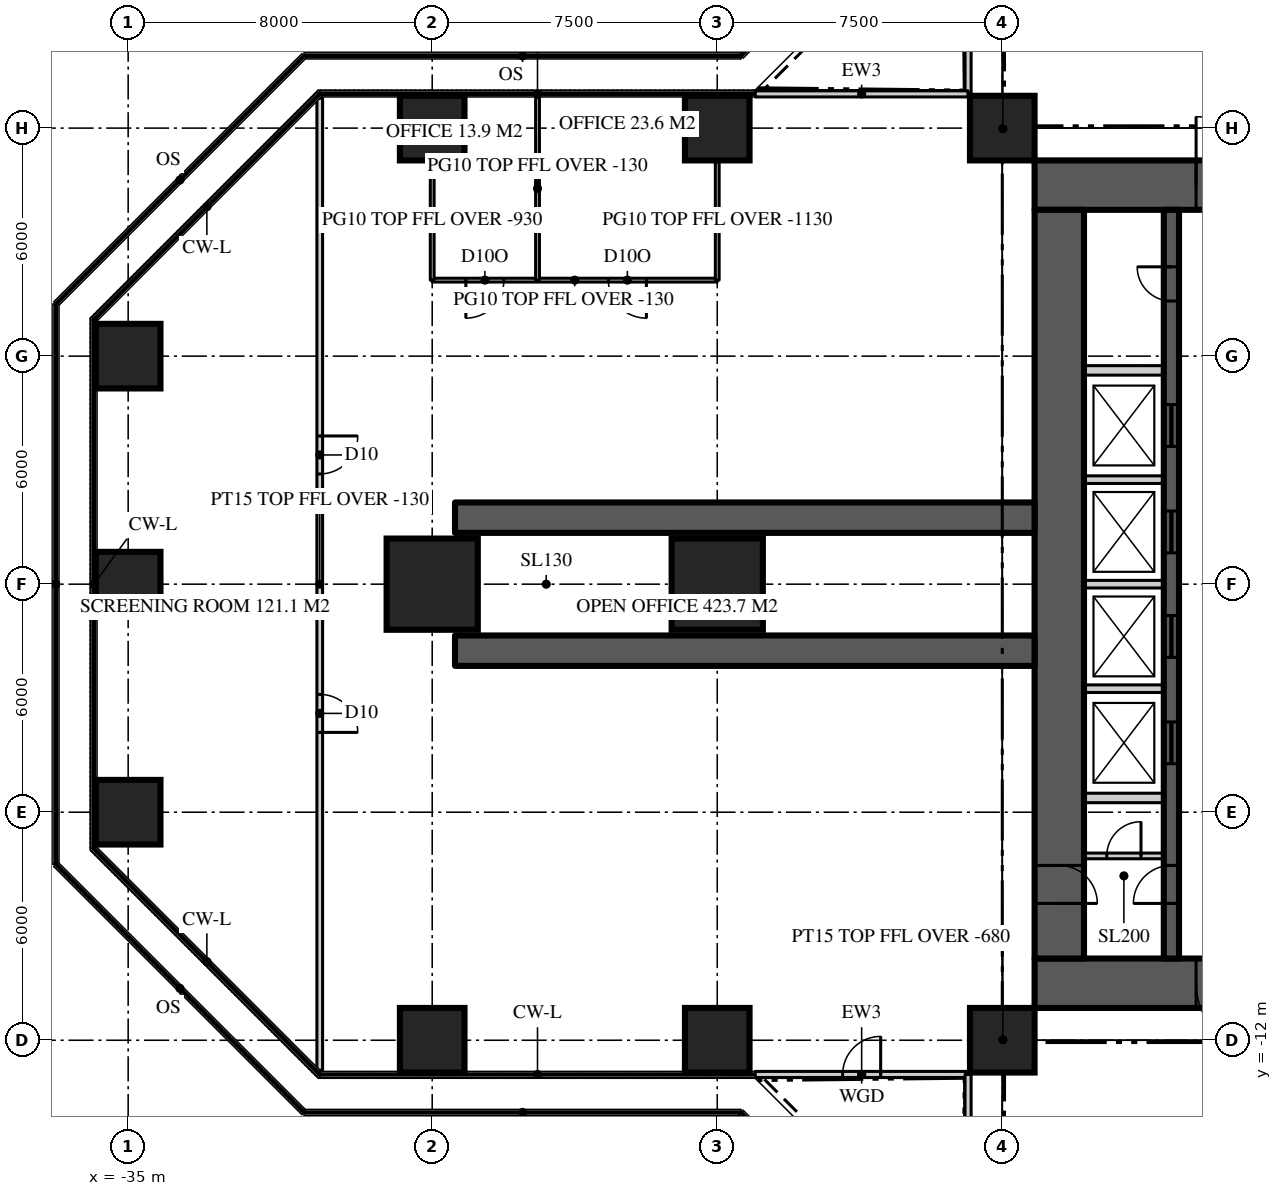
"""IFC4 building model, lengths in metres.
Left out: names, types, materials, properties, quantities, classifications, styles, units other than length and angle.
Written with IfcOpenShell. Run it as: python <this file> out.ifc"""

import sys

from ifc_helpers import new_model, si_unit, direction, frame, frame_2d, origin, origin_2d, place, context, subcontext, project, spatial, rectangle, extrude, element, fill, save


model = new_model("IFC4")
c1 = context("Model", 3, precision=1e-05, world=origin(), true_north=direction((0.0, 1.0)))
c2 = subcontext(c1, "Body", "Model", "MODEL_VIEW")
j1 = project(units=[si_unit("LENGTHUNIT", "METRE"), si_unit("PLANEANGLEUNIT", "RADIAN")], contexts=[c1])
p1 = place(None, origin())
s1 = spatial("IfcSite", under=j1, at=p1, CompositionType="ELEMENT")
p2 = place(p1, origin())
s2 = spatial("IfcBuilding", under=s1, at=p2, CompositionType="ELEMENT")
p3 = place(p2, frame((0.0, 0.0, 78.6)))
s3 = spatial("IfcBuildingStorey", under=s2, at=p3, CompositionType="ELEMENT", Elevation=78.6)
p4 = place(p3, frame((-11.15, 10.5, 0.0), z_axis=(0.0, 0.0, 1.0), x_axis=(1.0, 0.0, 0.0)))
e1 = element("IfcWall", 1, at=p4, inside=s3, PredefinedType="SHEAR", context=c2, shape_type="SweptSolid", body=[
    extrude(rectangle(XDim=22.3, YDim=1.3, at=frame_2d((11.15, 0.0))), origin(), (0.0, 0.0, 1.0), 3.9),
])
p5 = place(p4, frame((4.25, 0.0, 0.0)))
e2 = element("IfcOpeningElement", 2, at=p5, cuts=e1, PredefinedType="OPENING", context=c2, shape_type="SweptSolid", body=[
    extrude(rectangle(XDim=1.8, YDim=2.2, at=frame_2d((0.9, 1.1))), frame((0.0, 0.66, 0.0), z_axis=(0.0, -1.0, 0.0), x_axis=(1.0, 0.0, 0.0)), (0.0, 0.0, 1.0), 1.32),
])
p6 = place(p4, frame((16.25, 0.0, 0.0)))
e3 = element("IfcOpeningElement", 3, at=p6, cuts=e1, PredefinedType="OPENING", context=c2, shape_type="SweptSolid", body=[
    extrude(rectangle(XDim=1.8, YDim=2.2, at=frame_2d((0.9, 1.1))), frame((0.0, 0.66, 0.0), z_axis=(0.0, -1.0, 0.0), x_axis=(1.0, 0.0, 0.0)), (0.0, 0.0, 1.0), 1.32),
])
p7 = place(p3, frame((11.15, -10.5, 0.0), z_axis=(0.0, 0.0, 1.0), x_axis=(-1.0, 0.0, 0.0)))
e4 = element("IfcWall", 4, at=p7, inside=s3, PredefinedType="SHEAR", context=c2, shape_type="SweptSolid", body=[
    extrude(rectangle(XDim=22.3, YDim=1.3, at=frame_2d((11.15, 0.0))), origin(), (0.0, 0.0, 1.0), 3.9),
])
p8 = place(p7, frame((16.25, 0.0, 0.0)))
e5 = element("IfcOpeningElement", 5, at=p8, cuts=e4, PredefinedType="OPENING", context=c2, shape_type="SweptSolid", body=[
    extrude(rectangle(XDim=1.8, YDim=2.2, at=frame_2d((0.9, 1.1))), frame((0.0, 0.66, 0.0), z_axis=(0.0, -1.0, 0.0), x_axis=(1.0, 0.0, 0.0)), (0.0, 0.0, 1.0), 1.32),
])
p9 = place(p7, frame((4.25, 0.0, 0.0)))
e6 = element("IfcOpeningElement", 6, at=p9, cuts=e4, PredefinedType="OPENING", context=c2, shape_type="SweptSolid", body=[
    extrude(rectangle(XDim=1.8, YDim=2.2, at=frame_2d((0.9, 1.1))), frame((0.0, 0.66, 0.0), z_axis=(0.0, -1.0, 0.0), x_axis=(1.0, 0.0, 0.0)), (0.0, 0.0, 1.0), 1.32),
])
p10 = place(p3, frame((-10.5, 9.85, 0.0), z_axis=(0.0, 0.0, 1.0), x_axis=(0.0, -1.0, 0.0)))
e7 = element("IfcWall", 7, at=p10, inside=s3, PredefinedType="SHEAR", context=c2, shape_type="SweptSolid", body=[
    extrude(rectangle(XDim=19.7, YDim=1.3, at=frame_2d((9.85, 0.0))), origin(), (0.0, 0.0, 1.0), 3.9),
])
p11 = place(p10, frame((17.25, 0.0, 0.0)))
e8 = element("IfcOpeningElement", 8, at=p11, cuts=e7, PredefinedType="OPENING", context=c2, shape_type="SweptSolid", body=[
    extrude(rectangle(XDim=1.0, YDim=2.2, at=frame_2d((0.5, 1.1))), frame((0.0, 0.66, 0.0), z_axis=(0.0, -1.0, 0.0), x_axis=(1.0, 0.0, 0.0)), (0.0, 0.0, 1.0), 1.32),
])
for number, where, z_axis, x_axis in (
    (9, (-11.15, 1.75, 0.0), (0.0, 0.0, 1.0), (-1.0, 0.0, 0.0)),
    (10, (-11.15, -1.75, 0.0), (0.0, 0.0, 1.0), (-1.0, 0.0, 0.0)),
):
    element("IfcWall", number, at=place(p3, frame(where, z_axis=z_axis, x_axis=x_axis)), inside=s3, PredefinedType="SHEAR", context=c2, shape_type="SweptSolid", body=[
        extrude(rectangle(XDim=15.25, YDim=0.8, at=frame_2d((7.625, 0.0))), origin(), (0.0, 0.0, 1.0), 3.9),
    ])
for number, where, z_axis, x_axis in (
    (11, (-27.0, -12.0, 0.0), (0.0, 0.0, 1.0), (1.0, 0.0, 0.0)),
    (12, (-19.5, -12.0, 0.0), (0.0, 0.0, 1.0), (1.0, 0.0, 0.0)),
    (13, (-12.0, -12.0, 0.0), (0.0, 0.0, 1.0), (1.0, 0.0, 0.0)),
    (14, (-35.0, -6.0, 0.0), (0.0, 0.0, 1.0), (1.0, 0.0, 0.0)),
    (15, (-35.0, 0.0, 0.0), (0.0, 0.0, 1.0), (1.0, 0.0, 0.0)),
):
    element("IfcColumn", number, at=place(p3, frame(where, z_axis=z_axis, x_axis=x_axis)), inside=s3, PredefinedType="COLUMN", context=c2, shape_type="SweptSolid", body=[
        extrude(rectangle(XDim=1.7, YDim=1.7, at=origin_2d()), origin(), (0.0, 0.0, 1.0), 3.9),
    ])
for number, where, z_axis, x_axis in (
    (16, (-27.0, 0.0, 0.0), (0.0, 0.0, 1.0), (1.0, 0.0, 0.0)),
    (17, (-19.5, 0.0, 0.0), (0.0, 0.0, 1.0), (1.0, 0.0, 0.0)),
):
    element("IfcColumn", number, at=place(p3, frame(where, z_axis=z_axis, x_axis=x_axis)), inside=s3, PredefinedType="COLUMN", context=c2, shape_type="SweptSolid", body=[
        extrude(rectangle(XDim=2.4, YDim=2.4, at=origin_2d()), origin(), (0.0, 0.0, 1.0), 3.9),
    ])
for number, where, z_axis, x_axis in (
    (18, (-35.0, 6.0, 0.0), (0.0, 0.0, 1.0), (1.0, 0.0, 0.0)),
    (19, (-27.0, 12.0, 0.0), (0.0, 0.0, 1.0), (1.0, 0.0, 0.0)),
    (20, (-19.5, 12.0, 0.0), (0.0, 0.0, 1.0), (1.0, 0.0, 0.0)),
    (21, (-12.0, 12.0, 0.0), (0.0, 0.0, 1.0), (1.0, 0.0, 0.0)),
):
    element("IfcColumn", number, at=place(p3, frame(where, z_axis=z_axis, x_axis=x_axis)), inside=s3, PredefinedType="COLUMN", context=c2, shape_type="SweptSolid", body=[
        extrude(rectangle(XDim=1.7, YDim=1.7, at=origin_2d()), origin(), (0.0, 0.0, 1.0), 3.9),
    ])
p12 = place(p3, frame((-12.9, 18.5, 0.0), z_axis=(0.0, 0.0, 1.0), x_axis=(0.0, -1.0, 0.0)))
e22 = element("IfcWall", 22, at=p12, inside=s3, PredefinedType="SOLIDWALL", context=c2, shape_type="SweptSolid", body=[
    extrude(rectangle(XDim=5.6, YDim=0.16, at=frame_2d((2.8, 0.0))), origin(), (0.0, 0.0, 1.0), 3.77),
])
p13 = place(p12, frame((2.3, 0.0, 0.0)))
e23 = element("IfcOpeningElement", 23, at=p13, cuts=e22, PredefinedType="OPENING", context=c2, shape_type="SweptSolid", body=[
    extrude(rectangle(XDim=1.0, YDim=2.2, at=frame_2d((0.5, 1.1))), frame((0.0, 0.09, 0.0), z_axis=(0.0, -1.0, 0.0), x_axis=(1.0, 0.0, 0.0)), (0.0, 0.0, 1.0), 0.18),
])
p14 = place(p3, frame((-12.9, 12.9, 0.0), z_axis=(0.0, 0.0, 1.0), x_axis=(-1.0, 0.0, 0.0)))
e24 = element("IfcWall", 24, at=p14, inside=s3, PredefinedType="SOLIDWALL", context=c2, shape_type="SweptSolid", body=[
    extrude(rectangle(XDim=5.6, YDim=0.16, at=frame_2d((2.8, 0.0))), origin(), (0.0, 0.0, 1.0), 3.77),
])
p15 = place(p3, frame((-18.5, -12.9, 0.0), z_axis=(0.0, 0.0, 1.0), x_axis=(1.0, 0.0, 0.0)))
e25 = element("IfcWall", 25, at=p15, inside=s3, PredefinedType="SOLIDWALL", context=c2, shape_type="SweptSolid", body=[
    extrude(rectangle(XDim=5.6, YDim=0.16, at=frame_2d((2.8, 0.0))), origin(), (0.0, 0.0, 1.0), 3.77),
])
p16 = place(p15, frame((2.3, 0.0, 0.0)))
e26 = element("IfcOpeningElement", 26, at=p16, cuts=e25, PredefinedType="OPENING", context=c2, shape_type="SweptSolid", body=[
    extrude(rectangle(XDim=1.0, YDim=2.2, at=frame_2d((0.5, 1.1))), frame((0.0, 0.09, 0.0), z_axis=(0.0, -1.0, 0.0), x_axis=(1.0, 0.0, 0.0)), (0.0, 0.0, 1.0), 0.18),
])
p17 = place(p3, frame((-12.9, -12.9, 0.0), z_axis=(0.0, 0.0, 1.0), x_axis=(0.0, -1.0, 0.0)))
e27 = element("IfcWall", 27, at=p17, inside=s3, PredefinedType="SOLIDWALL", context=c2, shape_type="SweptSolid", body=[
    extrude(rectangle(XDim=5.6, YDim=0.16, at=frame_2d((2.8, 0.0))), origin(), (0.0, 0.0, 1.0), 3.77),
])
p18 = place(p3, frame((-7.55, -9.85, 0.0), z_axis=(0.0, 0.0, 1.0), x_axis=(0.0, 1.0, 0.0)))
e28 = element("IfcWall", 28, at=p18, inside=s3, PredefinedType="SHEAR", context=c2, shape_type="SweptSolid", body=[
    extrude(rectangle(XDim=19.7, YDim=0.4, at=frame_2d((9.85, 0.0))), origin(), (0.0, 0.0, 1.0), 3.9),
])
p19 = place(p18, frame((1.45, 0.0, 0.0)))
e29 = element("IfcOpeningElement", 29, at=p19, cuts=e28, PredefinedType="OPENING", context=c2, shape_type="SweptSolid", body=[
    extrude(rectangle(XDim=1.0, YDim=2.2, at=frame_2d((0.5, 1.1))), frame((0.0, 0.21, 0.0), z_axis=(0.0, -1.0, 0.0), x_axis=(1.0, 0.0, 0.0)), (0.0, 0.0, 1.0), 0.42),
])
p20 = place(p18, frame((17.3, 0.0, 0.0)))
e30 = element("IfcOpeningElement", 30, at=p20, cuts=e28, PredefinedType="OPENING", context=c2, shape_type="SweptSolid", body=[
    extrude(rectangle(XDim=0.9, YDim=2.1, at=frame_2d((0.45, 1.05))), frame((0.0, 0.21, 0.0), z_axis=(0.0, -1.0, 0.0), x_axis=(1.0, 0.0, 0.0)), (0.0, 0.0, 1.0), 0.42),
])
p21 = place(p18, frame((5.125, 0.0, 0.0)))
e31 = element("IfcOpeningElement", 31, at=p21, cuts=e28, PredefinedType="OPENING", context=c2, shape_type="SweptSolid", body=[
    extrude(rectangle(XDim=1.1, YDim=2.2, at=frame_2d((0.55, 1.1))), frame((0.0, 0.21, 0.0), z_axis=(0.0, -1.0, 0.0), x_axis=(1.0, 0.0, 0.0)), (0.0, 0.0, 1.0), 0.42),
])
p22 = place(p18, frame((7.925, 0.0, 0.0)))
e32 = element("IfcOpeningElement", 32, at=p22, cuts=e28, PredefinedType="OPENING", context=c2, shape_type="SweptSolid", body=[
    extrude(rectangle(XDim=1.1, YDim=2.2, at=frame_2d((0.55, 1.1))), frame((0.0, 0.21, 0.0), z_axis=(0.0, -1.0, 0.0), x_axis=(1.0, 0.0, 0.0)), (0.0, 0.0, 1.0), 0.42),
])
p23 = place(p18, frame((10.675, 0.0, 0.0)))
e33 = element("IfcOpeningElement", 33, at=p23, cuts=e28, PredefinedType="OPENING", context=c2, shape_type="SweptSolid", body=[
    extrude(rectangle(XDim=1.1, YDim=2.2, at=frame_2d((0.55, 1.1))), frame((0.0, 0.21, 0.0), z_axis=(0.0, -1.0, 0.0), x_axis=(1.0, 0.0, 0.0)), (0.0, 0.0, 1.0), 0.42),
])
p24 = place(p18, frame((13.475, 0.0, 0.0)))
e34 = element("IfcOpeningElement", 34, at=p24, cuts=e28, PredefinedType="OPENING", context=c2, shape_type="SweptSolid", body=[
    extrude(rectangle(XDim=1.1, YDim=2.2, at=frame_2d((0.55, 1.1))), frame((0.0, 0.21, 0.0), z_axis=(0.0, -1.0, 0.0), x_axis=(1.0, 0.0, 0.0)), (0.0, 0.0, 1.0), 0.42),
])
for number, where, z_axis, x_axis in (
    (35, (-9.85, 5.625, 0.0), (0.0, 0.0, 1.0), (1.0, 0.0, 0.0)),
    (36, (-9.85, -5.625, 0.0), (0.0, 0.0, 1.0), (1.0, 0.0, 0.0)),
):
    element("IfcWall", number, at=place(p3, frame(where, z_axis=z_axis, x_axis=x_axis)), inside=s3, PredefinedType="SOLIDWALL", context=c2, shape_type="SweptSolid", body=[
        extrude(rectangle(XDim=2.1, YDim=0.25, at=frame_2d((1.05, 0.0))), origin(), (0.0, 0.0, 1.0), 3.7),
    ])
for number, where, z_axis, x_axis in (
    (37, (-9.85, -2.75, 0.0), (0.0, 0.0, 1.0), (1.0, 0.0, 0.0)),
    (38, (-9.85, 0.0, 0.0), (0.0, 0.0, 1.0), (1.0, 0.0, 0.0)),
    (39, (-9.85, 2.75, 0.0), (0.0, 0.0, 1.0), (1.0, 0.0, 0.0)),
):
    element("IfcWall", number, at=place(p3, frame(where, z_axis=z_axis, x_axis=x_axis)), inside=s3, PredefinedType="SOLIDWALL", context=c2, shape_type="SweptSolid", body=[
        extrude(rectangle(XDim=2.1, YDim=0.2, at=frame_2d((1.05, 0.0))), origin(), (0.0, 0.0, 1.0), 3.7),
    ])
p25 = place(p3, frame((-29.959, 12.786, 0.0), z_axis=(0.0, 0.0, 1.0), x_axis=(0.0, -1.0, 0.0)))
e40 = element("IfcWall", 40, at=p25, inside=s3, PredefinedType="PARTITIONING", context=c2, shape_type="SweptSolid", body=[
    extrude(rectangle(XDim=25.573, YDim=0.15, at=frame_2d((12.786, 0.0))), origin(), (0.0, 0.0, 1.0), 3.77),
])
p26 = place(p25, frame((15.687, 0.0, 0.0)))
e41 = element("IfcOpeningElement", 41, at=p26, cuts=e40, PredefinedType="OPENING", context=c2, shape_type="SweptSolid", body=[
    extrude(rectangle(XDim=1.0, YDim=2.2, at=frame_2d((0.5, 1.1))), frame((0.0, 0.085, 0.0), z_axis=(0.0, -1.0, 0.0), x_axis=(1.0, 0.0, 0.0)), (0.0, 0.0, 1.0), 0.17),
])
p27 = place(p25, frame((8.886, 0.0, 0.0)))
e42 = element("IfcOpeningElement", 42, at=p27, cuts=e40, PredefinedType="OPENING", context=c2, shape_type="SweptSolid", body=[
    extrude(rectangle(XDim=1.0, YDim=2.2, at=frame_2d((0.5, 1.1))), frame((0.0, 0.085, 0.0), z_axis=(0.0, -1.0, 0.0), x_axis=(1.0, 0.0, 0.0)), (0.0, 0.0, 1.0), 0.17),
])
p28 = place(p3, frame((-19.5, 8.0, 0.0), z_axis=(0.0, 0.0, 1.0), x_axis=(-1.0, 0.0, 0.0)))
e43 = element("IfcWall", 43, at=p28, inside=s3, PredefinedType="PARTITIONING", context=c2, shape_type="SweptSolid", body=[
    extrude(rectangle(XDim=7.5, YDim=0.1, at=frame_2d((3.75, 0.0))), origin(), (0.0, 0.0, 1.0), 3.77),
])
p29 = place(p28, frame((1.865, 0.0, 0.0)))
e44 = element("IfcOpeningElement", 44, at=p29, cuts=e43, PredefinedType="OPENING", context=c2, shape_type="SweptSolid", body=[
    extrude(rectangle(XDim=1.0, YDim=2.2, at=frame_2d((0.5, 1.1))), frame((0.0, 0.06, 0.0), z_axis=(0.0, -1.0, 0.0), x_axis=(1.0, 0.0, 0.0)), (0.0, 0.0, 1.0), 0.12),
])
p30 = place(p28, frame((5.615, 0.0, 0.0)))
e45 = element("IfcOpeningElement", 45, at=p30, cuts=e43, PredefinedType="OPENING", context=c2, shape_type="SweptSolid", body=[
    extrude(rectangle(XDim=1.0, YDim=2.2, at=frame_2d((0.5, 1.1))), frame((0.0, 0.06, 0.0), z_axis=(0.0, -1.0, 0.0), x_axis=(1.0, 0.0, 0.0)), (0.0, 0.0, 1.0), 0.12),
])
p31 = place(p3, frame((-19.5, 8.0, 0.0), z_axis=(0.0, 0.0, 1.0), x_axis=(0.0, 1.0, 0.0)))
e46 = element("IfcWall", 46, at=p31, inside=s3, PredefinedType="PARTITIONING", context=c2, shape_type="SweptSolid", body=[
    extrude(rectangle(XDim=3.15, YDim=0.1, at=frame_2d((1.575, 0.0))), origin(), (0.0, 0.0, 1.0), 2.77),
])
p32 = place(p3, frame((-24.229, 8.0, 0.0), z_axis=(0.0, 0.0, 1.0), x_axis=(0.0, 1.0, 0.0)))
e47 = element("IfcWall", 47, at=p32, inside=s3, PredefinedType="PARTITIONING", context=c2, shape_type="SweptSolid", body=[
    extrude(rectangle(XDim=4.82, YDim=0.1, at=frame_2d((2.41, 0.0))), origin(), (0.0, 0.0, 1.0), 3.77),
])
p33 = place(p3, frame((-27.0, 8.0, 0.0), z_axis=(0.0, 0.0, 1.0), x_axis=(0.0, 1.0, 0.0)))
e48 = element("IfcWall", 48, at=p33, inside=s3, PredefinedType="PARTITIONING", context=c2, shape_type="SweptSolid", body=[
    extrude(rectangle(XDim=3.15, YDim=0.1, at=frame_2d((1.575, 0.0))), origin(), (0.0, 0.0, 1.0), 2.97),
])
for number, where, z_axis, x_axis in (
    (49, (-11.15, 11.15, 0.0), (0.0, 0.0, 1.0), (-0.707, 0.707, 0.0)),
    (50, (-11.15, -11.15, 0.0), (0.0, 0.0, 1.0), (-0.707, -0.707, 0.0)),
):
    element("IfcWall", number, at=place(p3, frame(where, z_axis=z_axis, x_axis=x_axis)), inside=s3, PredefinedType="PARTITIONING", context=c2, shape_type="SweptSolid", body=[
        extrude(rectangle(XDim=2.362, YDim=0.15, at=frame_2d((1.181, 0.0))), origin(), (0.0, 0.0, 1.0), 3.22),
    ])
p34 = place(p3, frame((-9.85, -7.15, 0.0), z_axis=(0.0, 0.0, 1.0), x_axis=(1.0, 0.0, 0.0)))
e51 = element("IfcWall", 51, at=p34, inside=s3, PredefinedType="SOLIDWALL", context=c2, shape_type="SweptSolid", body=[
    extrude(rectangle(XDim=2.1, YDim=0.15, at=frame_2d((1.05, 0.0))), origin(), (0.0, 0.0, 1.0), 3.77),
])
p35 = place(p34, frame((0.6, 0.0, 0.0)))
e52 = element("IfcOpeningElement", 52, at=p35, cuts=e51, PredefinedType="OPENING", context=c2, shape_type="SweptSolid", body=[
    extrude(rectangle(XDim=0.9, YDim=2.1, at=frame_2d((0.45, 1.05))), frame((0.0, 0.085, 0.0), z_axis=(0.0, -1.0, 0.0), x_axis=(1.0, 0.0, 0.0)), (0.0, 0.0, 1.0), 0.17),
])
p36 = place(p16, origin())
e53 = element("IfcDoor", 53, at=p36, inside=s3, OperationType="SINGLE_SWING_RIGHT", PredefinedType="DOOR", context=c2, shape_type="SweptSolid", body=[
    extrude(rectangle(XDim=1.0, YDim=2.2, at=frame_2d((0.5, 1.1))), frame((0.0, 0.025, 0.0), z_axis=(0.0, -1.0, 0.0), x_axis=(1.0, 0.0, 0.0)), (0.0, 0.0, 1.0), 0.05),
])
fill(e26, e53)
p37 = place(p5, origin())
e54 = element("IfcDoor", 54, at=p37, inside=s3, OperationType="DOUBLE_DOOR_DOUBLE_SWING", PredefinedType="DOOR", context=c2, shape_type="SweptSolid", body=[
    extrude(rectangle(XDim=1.8, YDim=2.2, at=frame_2d((0.9, 1.1))), frame((0.0, 0.025, 0.0), z_axis=(0.0, -1.0, 0.0), x_axis=(1.0, 0.0, 0.0)), (0.0, 0.0, 1.0), 0.05),
])
fill(e2, e54)
p38 = place(p8, origin())
e55 = element("IfcDoor", 55, at=p38, inside=s3, OperationType="DOUBLE_DOOR_DOUBLE_SWING", PredefinedType="DOOR", context=c2, shape_type="SweptSolid", body=[
    extrude(rectangle(XDim=1.8, YDim=2.2, at=frame_2d((0.9, 1.1))), frame((0.0, 0.025, 0.0), z_axis=(0.0, -1.0, 0.0), x_axis=(1.0, 0.0, 0.0)), (0.0, 0.0, 1.0), 0.05),
])
fill(e5, e55)
p39 = place(p19, origin())
e56 = element("IfcDoor", 56, at=p39, inside=s3, OperationType="SINGLE_SWING_LEFT", PredefinedType="DOOR", context=c2, shape_type="SweptSolid", body=[
    extrude(rectangle(XDim=1.0, YDim=2.2, at=frame_2d((0.5, 1.1))), frame((0.0, 0.025, 0.0), z_axis=(0.0, -1.0, 0.0), x_axis=(1.0, 0.0, 0.0)), (0.0, 0.0, 1.0), 0.05),
])
fill(e29, e56)
p40 = place(p11, origin())
e57 = element("IfcDoor", 57, at=p40, inside=s3, OperationType="SINGLE_SWING_RIGHT", PredefinedType="DOOR", context=c2, shape_type="SweptSolid", body=[
    extrude(rectangle(XDim=1.0, YDim=2.2, at=frame_2d((0.5, 1.1))), frame((0.0, 0.025, 0.0), z_axis=(0.0, -1.0, 0.0), x_axis=(1.0, 0.0, 0.0)), (0.0, 0.0, 1.0), 0.05),
])
fill(e8, e57)
p41 = place(p20, origin())
e58 = element("IfcDoor", 58, at=p41, inside=s3, OperationType="SINGLE_SWING_RIGHT", PredefinedType="DOOR", context=c2, shape_type="SweptSolid", body=[
    extrude(rectangle(XDim=0.9, YDim=2.1, at=frame_2d((0.45, 1.05))), frame((0.0, 0.025, 0.0), z_axis=(0.0, -1.0, 0.0), x_axis=(1.0, 0.0, 0.0)), (0.0, 0.0, 1.0), 0.05),
])
fill(e30, e58)
p42 = place(p21, origin())
e59 = element("IfcDoor", 59, at=p42, inside=s3, OperationType="SLIDING_TO_LEFT", PredefinedType="DOOR", context=c2, shape_type="SweptSolid", body=[
    extrude(rectangle(XDim=1.1, YDim=2.2, at=frame_2d((0.55, 1.1))), frame((0.0, 0.025, 0.0), z_axis=(0.0, -1.0, 0.0), x_axis=(1.0, 0.0, 0.0)), (0.0, 0.0, 1.0), 0.05),
])
fill(e31, e59)
p43 = place(p22, origin())
e60 = element("IfcDoor", 60, at=p43, inside=s3, OperationType="SLIDING_TO_LEFT", PredefinedType="DOOR", context=c2, shape_type="SweptSolid", body=[
    extrude(rectangle(XDim=1.1, YDim=2.2, at=frame_2d((0.55, 1.1))), frame((0.0, 0.025, 0.0), z_axis=(0.0, -1.0, 0.0), x_axis=(1.0, 0.0, 0.0)), (0.0, 0.0, 1.0), 0.05),
])
fill(e32, e60)
p44 = place(p23, origin())
e61 = element("IfcDoor", 61, at=p44, inside=s3, OperationType="SLIDING_TO_LEFT", PredefinedType="DOOR", context=c2, shape_type="SweptSolid", body=[
    extrude(rectangle(XDim=1.1, YDim=2.2, at=frame_2d((0.55, 1.1))), frame((0.0, 0.025, 0.0), z_axis=(0.0, -1.0, 0.0), x_axis=(1.0, 0.0, 0.0)), (0.0, 0.0, 1.0), 0.05),
])
fill(e33, e61)
p45 = place(p24, origin())
e62 = element("IfcDoor", 62, at=p45, inside=s3, OperationType="SLIDING_TO_LEFT", PredefinedType="DOOR", context=c2, shape_type="SweptSolid", body=[
    extrude(rectangle(XDim=1.1, YDim=2.2, at=frame_2d((0.55, 1.1))), frame((0.0, 0.025, 0.0), z_axis=(0.0, -1.0, 0.0), x_axis=(1.0, 0.0, 0.0)), (0.0, 0.0, 1.0), 0.05),
])
fill(e34, e62)
p46 = place(p26, origin())
e63 = element("IfcDoor", 63, at=p46, inside=s3, OperationType="SINGLE_SWING_RIGHT", PredefinedType="DOOR", context=c2, shape_type="SweptSolid", body=[
    extrude(rectangle(XDim=1.0, YDim=2.2, at=frame_2d((0.5, 1.1))), frame((0.0, 0.025, 0.0), z_axis=(0.0, -1.0, 0.0), x_axis=(1.0, 0.0, 0.0)), (0.0, 0.0, 1.0), 0.05),
])
fill(e41, e63)
p47 = place(p27, origin())
e64 = element("IfcDoor", 64, at=p47, inside=s3, OperationType="SINGLE_SWING_LEFT", PredefinedType="DOOR", context=c2, shape_type="SweptSolid", body=[
    extrude(rectangle(XDim=1.0, YDim=2.2, at=frame_2d((0.5, 1.1))), frame((0.0, 0.025, 0.0), z_axis=(0.0, -1.0, 0.0), x_axis=(1.0, 0.0, 0.0)), (0.0, 0.0, 1.0), 0.05),
])
fill(e42, e64)
p48 = place(p29, origin())
e65 = element("IfcDoor", 65, at=p48, inside=s3, OperationType="SINGLE_SWING_LEFT", PredefinedType="DOOR", context=c2, shape_type="SweptSolid", body=[
    extrude(rectangle(XDim=1.0, YDim=2.2, at=frame_2d((0.5, 1.1))), frame((0.0, 0.025, 0.0), z_axis=(0.0, -1.0, 0.0), x_axis=(1.0, 0.0, 0.0)), (0.0, 0.0, 1.0), 0.05),
])
fill(e44, e65)
p49 = place(p30, origin())
e66 = element("IfcDoor", 66, at=p49, inside=s3, OperationType="SINGLE_SWING_RIGHT", PredefinedType="DOOR", context=c2, shape_type="SweptSolid", body=[
    extrude(rectangle(XDim=1.0, YDim=2.2, at=frame_2d((0.5, 1.1))), frame((0.0, 0.025, 0.0), z_axis=(0.0, -1.0, 0.0), x_axis=(1.0, 0.0, 0.0)), (0.0, 0.0, 1.0), 0.05),
])
fill(e45, e66)
p50 = place(p35, origin())
e67 = element("IfcDoor", 67, at=p50, inside=s3, OperationType="SINGLE_SWING_RIGHT", PredefinedType="DOOR", context=c2, shape_type="SweptSolid", body=[
    extrude(rectangle(XDim=0.9, YDim=2.1, at=frame_2d((0.45, 1.05))), frame((0.0, 0.025, 0.0), z_axis=(0.0, -1.0, 0.0), x_axis=(1.0, 0.0, 0.0)), (0.0, 0.0, 1.0), 0.05),
])
fill(e52, e67)
save(model, sys.argv[1])
